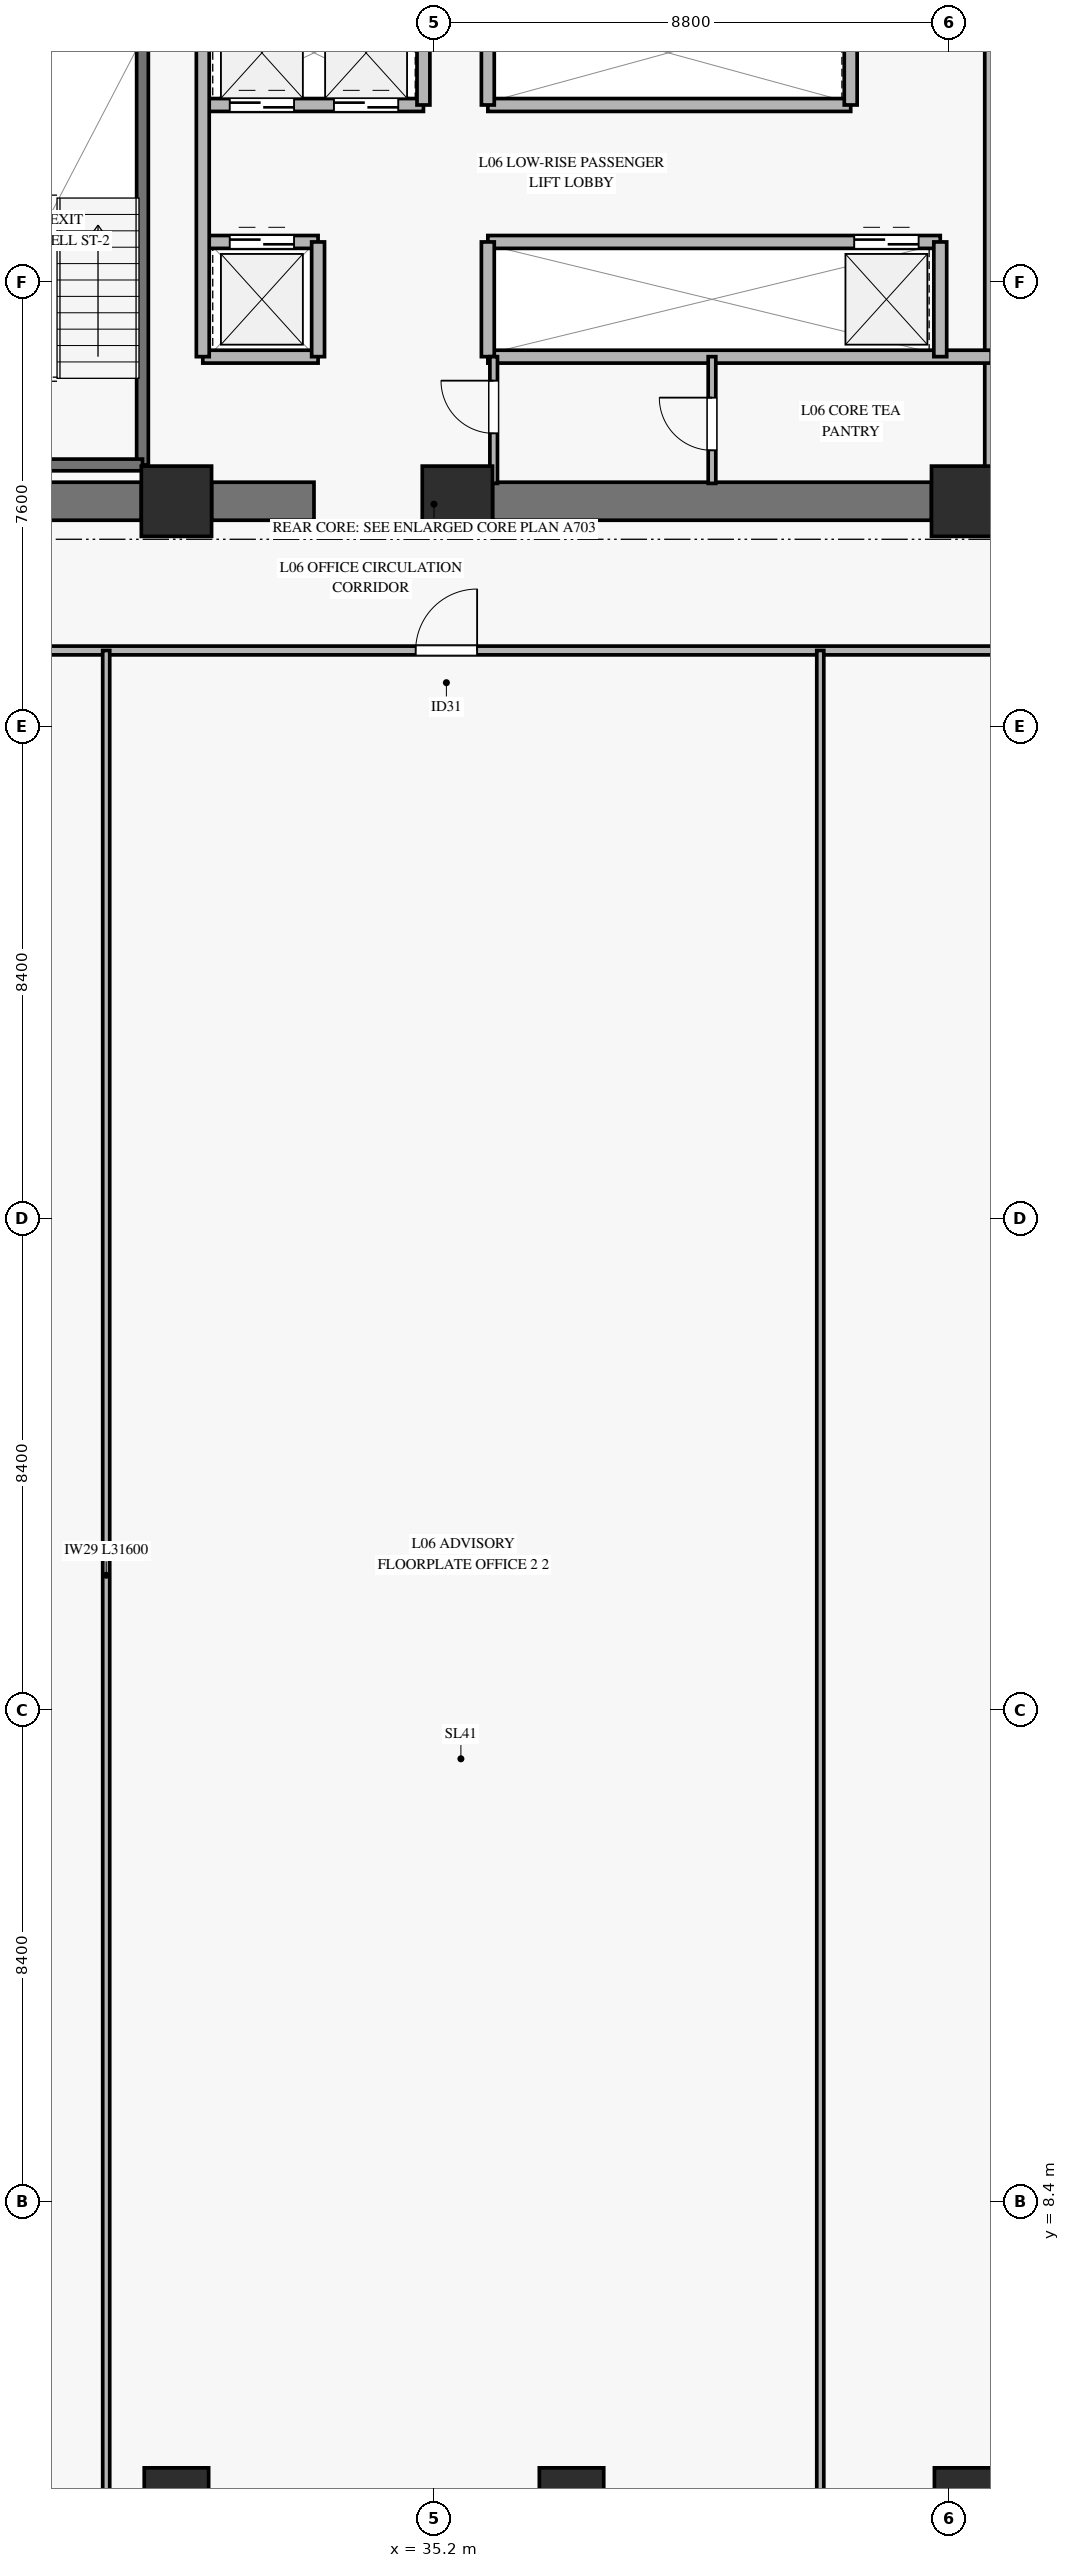
"""IFC4 building model, lengths in metres.
Left out: names, types, materials, properties, quantities, classifications, styles, units other than length and angle.
Written with IfcOpenShell. Run it as: python <this file> out.ifc"""

import sys

from ifc_helpers import new_model, si_unit, direction, frame, frame_2d, origin, origin_2d, place, context, subcontext, project, spatial, rectangle, hollow_rectangle, extrude, source, transform, mapped, element, fill, save


model = new_model("IFC4")
c1 = context("Model", 3, precision=1e-05, world=origin(), true_north=direction((0.0, 1.0)))
c2 = subcontext(c1, "Body", "Model", "MODEL_VIEW")
j1 = project(units=[si_unit("LENGTHUNIT", "METRE"), si_unit("PLANEANGLEUNIT", "RADIAN")], contexts=[c1])
p1 = place(None, origin())
s1 = spatial("IfcSite", under=j1, at=p1, CompositionType="ELEMENT")
p2 = place(p1, origin())
s2 = spatial("IfcBuilding", under=s1, at=p2, CompositionType="ELEMENT")
p3 = place(p2, frame((0.0, 0.0, 25.4)))
s3 = spatial("IfcBuildingStorey", under=s2, at=p3, CompositionType="ELEMENT", Elevation=25.4)
m1 = source(origin(), c2, "Body", "SweptSolid", [
    extrude(rectangle(XDim=1.2, YDim=1.2, at=origin_2d()), origin(), (0.0, 0.0, 1.0), 3.68),
])
for number, where, z_axis, x_axis in (
    (1, (30.8, 37.45, 0.0), (0.0, 0.0, 1.0), (1.0, 0.0, 0.0)),
    (2, (35.6, 37.45, 0.0), (0.0, 0.0, 1.0), (1.0, 0.0, 0.0)),
    (3, (44.3, 37.45, 0.0), (0.0, 0.0, 1.0), (1.0, 0.0, 0.0)),
):
    element("IfcColumn", number, at=place(p3, frame(where, z_axis=z_axis, x_axis=x_axis)), inside=s3, PredefinedType="PILASTER", context=c2, shape_type="MappedRepresentation", body=[
        mapped(m1, transform((0.0, 0.0, 0.0), x_axis=(1.0, 0.0, 0.0), y_axis=(0.0, 1.0, 0.0), z_axis=(0.0, 0.0, 1.0), scale=1.0)),
    ])
p4 = place(p3, frame((20.45, 37.45, 0.0), z_axis=(0.0, 0.0, 1.0), x_axis=(1.0, 0.0, 0.0)))
e4 = element("IfcWall", 4, at=p4, inside=s3, PredefinedType="SHEAR", context=c2, shape_type="SweptSolid", body=[
    extrude(rectangle(XDim=9.75, YDim=0.65, at=frame_2d((4.875, 0.0))), origin(), (0.0, 0.0, 1.0), 3.68),
])
p5 = place(p4, frame((4.1, 0.0, 0.0)))
e5 = element("IfcOpeningElement", 5, at=p5, cuts=e4, PredefinedType="OPENING", context=c2, shape_type="SweptSolid", body=[
    extrude(rectangle(XDim=1.2, YDim=2.15, at=frame_2d((0.6, 1.075))), frame((0.0, 0.335, 0.0), z_axis=(0.0, -1.0, 0.0), x_axis=(1.0, 0.0, 0.0)), (0.0, 0.0, 1.0), 0.67),
])
p6 = place(p3, frame((31.4, 37.45, 0.0), z_axis=(0.0, 0.0, 1.0), x_axis=(1.0, 0.0, 0.0)))
e6 = element("IfcWall", 6, at=p6, inside=s3, PredefinedType="SHEAR", context=c2, shape_type="SweptSolid", body=[
    extrude(rectangle(XDim=1.75, YDim=0.65, at=frame_2d((0.875, 0.0))), origin(), (0.0, 0.0, 1.0), 3.68),
])
p7 = place(p3, frame((36.2, 37.45, 0.0), z_axis=(0.0, 0.0, 1.0), x_axis=(1.0, 0.0, 0.0)))
e7 = element("IfcWall", 7, at=p7, inside=s3, PredefinedType="SHEAR", context=c2, shape_type="SweptSolid", body=[
    extrude(rectangle(XDim=7.5, YDim=0.65, at=frame_2d((3.75, 0.0))), origin(), (0.0, 0.0, 1.0), 3.68),
])
m2 = source(origin(), c2, "Body", "SweptSolid", [
    extrude(hollow_rectangle(XDim=1.1, YDim=1.1, WallThickness=0.05, at=origin_2d()), origin(), (0.0, 0.0, 1.0), 3.68),
])
for number, where, z_axis, x_axis in (
    (8, (30.8, 3.3, 0.0), (0.0, 0.0, 1.0), (1.0, 0.0, 0.0)),
    (9, (37.55, 3.3, 0.0), (0.0, 0.0, 1.0), (1.0, 0.0, 0.0)),
    (10, (44.3, 3.3, 0.0), (0.0, 0.0, 1.0), (1.0, 0.0, 0.0)),
):
    element("IfcColumn", number, at=place(p3, frame(where, z_axis=z_axis, x_axis=x_axis)), inside=s3, PredefinedType="COLUMN", context=c2, shape_type="MappedRepresentation", body=[
        mapped(m2, transform((0.0, 0.0, 0.0), x_axis=(1.0, 0.0, 0.0), y_axis=(0.0, 1.0, 0.0), z_axis=(0.0, 0.0, 1.0), scale=1.0)),
    ])
p8 = place(p3, frame((30.22, 38.07, 0.0), z_axis=(0.0, 0.0, 1.0), x_axis=(0.0, 1.0, 0.0)))
e11 = element("IfcWall", 11, at=p8, inside=s3, PredefinedType="SOLIDWALL", context=c2, shape_type="SweptSolid", body=[
    extrude(rectangle(XDim=7.25, YDim=0.2, at=frame_2d((3.625, 0.0))), origin(), (0.0, 0.0, 1.0), 3.9),
])
p9 = place(p3, frame((27.14, 38.07, 0.0), z_axis=(0.0, 0.0, 1.0), x_axis=(1.0, 0.0, 0.0)))
e12 = element("IfcWall", 12, at=p9, inside=s3, PredefinedType="SOLIDWALL", context=c2, shape_type="SweptSolid", body=[
    extrude(rectangle(XDim=3.08, YDim=0.2, at=frame_2d((1.54, 0.0))), origin(), (0.0, 0.0, 1.0), 3.9),
])
p10 = place(p3, frame((44.72, 37.755, 0.0), z_axis=(0.0, 0.0, 1.0), x_axis=(0.0, 1.0, 0.0)))
e13 = element("IfcWall", 13, at=p10, inside=s3, PredefinedType="SOLIDWALL", context=c2, shape_type="SweptSolid", body=[
    extrude(rectangle(XDim=7.465, YDim=0.22, at=frame_2d((3.732, 0.0))), origin(), (0.0, 0.0, 1.0), 3.68),
])
p11 = place(p3, frame((31.25, 44.22, 0.0), z_axis=(0.0, 0.0, 1.0), x_axis=(1.0, 0.0, 0.0)))
e14 = element("IfcWall", 14, at=p11, inside=s3, PredefinedType="SOLIDWALL", context=c2, shape_type="SweptSolid", body=[
    extrude(rectangle(XDim=3.77, YDim=0.22, at=frame_2d((1.885, 0.0))), origin(), (0.0, 0.0, 1.0), 3.68),
])
p12 = place(p11, frame((0.46, 0.0, 0.0)))
e15 = element("IfcOpeningElement", 15, at=p12, cuts=e14, PredefinedType="OPENING", context=c2, shape_type="SweptSolid", body=[
    extrude(rectangle(XDim=1.1, YDim=2.2, at=frame_2d((0.55, 1.1))), frame((0.0, 0.12, 0.0), z_axis=(0.0, -1.0, 0.0), x_axis=(1.0, 0.0, 0.0)), (0.0, 0.0, 1.0), 0.24),
])
p13 = place(p11, frame((2.24, 0.0, 0.0)))
e16 = element("IfcOpeningElement", 16, at=p13, cuts=e14, PredefinedType="OPENING", context=c2, shape_type="SweptSolid", body=[
    extrude(rectangle(XDim=1.1, YDim=2.2, at=frame_2d((0.55, 1.1))), frame((0.0, 0.12, 0.0), z_axis=(0.0, -1.0, 0.0), x_axis=(1.0, 0.0, 0.0)), (0.0, 0.0, 1.0), 0.24),
])
p14 = place(p3, frame((36.12, 44.22, 0.0), z_axis=(0.0, 0.0, 1.0), x_axis=(1.0, 0.0, 0.0)))
e17 = element("IfcWall", 17, at=p14, inside=s3, PredefinedType="SOLIDWALL", context=c2, shape_type="SweptSolid", body=[
    extrude(rectangle(XDim=6.2, YDim=0.22, at=frame_2d((3.1, 0.0))), origin(), (0.0, 0.0, 1.0), 3.68),
])
for number, where, z_axis, x_axis in (
    (18, (35.02, 44.22, 0.0), (0.0, 0.0, 1.0), (0.0, 1.0, 0.0)),
    (19, (36.12, 44.22, 0.0), (0.0, 0.0, 1.0), (0.0, 1.0, 0.0)),
    (20, (42.32, 44.22, 0.0), (0.0, 0.0, 1.0), (0.0, 1.0, 0.0)),
):
    element("IfcWall", number, at=place(p3, frame(where, z_axis=z_axis, x_axis=x_axis)), inside=s3, PredefinedType="SOLIDWALL", context=c2, shape_type="SweptSolid", body=[
        extrude(rectangle(XDim=2.025, YDim=0.22, at=frame_2d((1.013, 0.0))), origin(), (0.0, 0.0, 1.0), 3.68),
    ])
p15 = place(p3, frame((31.25, 41.88, 0.0), z_axis=(0.0, 0.0, 1.0), x_axis=(1.0, 0.0, 0.0)))
e21 = element("IfcWall", 21, at=p15, inside=s3, PredefinedType="SOLIDWALL", context=c2, shape_type="SweptSolid", body=[
    extrude(rectangle(XDim=1.97, YDim=0.22, at=frame_2d((0.985, 0.0))), origin(), (0.0, 0.0, 1.0), 3.68),
])
p16 = place(p15, frame((0.46, 0.0, 0.0)))
e22 = element("IfcOpeningElement", 22, at=p16, cuts=e21, PredefinedType="OPENING", context=c2, shape_type="SweptSolid", body=[
    extrude(rectangle(XDim=1.1, YDim=2.2, at=frame_2d((0.55, 1.1))), frame((0.0, 0.12, 0.0), z_axis=(0.0, -1.0, 0.0), x_axis=(1.0, 0.0, 0.0)), (0.0, 0.0, 1.0), 0.24),
])
p17 = place(p3, frame((36.12, 41.88, 0.0), z_axis=(0.0, 0.0, 1.0), x_axis=(1.0, 0.0, 0.0)))
e23 = element("IfcWall", 23, at=p17, inside=s3, PredefinedType="SOLIDWALL", context=c2, shape_type="SweptSolid", body=[
    extrude(rectangle(XDim=7.73, YDim=0.22, at=frame_2d((3.865, 0.0))), origin(), (0.0, 0.0, 1.0), 3.68),
])
p18 = place(p17, frame((6.26, 0.0, 0.0)))
e24 = element("IfcOpeningElement", 24, at=p18, cuts=e23, PredefinedType="OPENING", context=c2, shape_type="SweptSolid", body=[
    extrude(rectangle(XDim=1.1, YDim=2.2, at=frame_2d((0.55, 1.1))), frame((0.0, 0.12, 0.0), z_axis=(0.0, -1.0, 0.0), x_axis=(1.0, 0.0, 0.0)), (0.0, 0.0, 1.0), 0.24),
])
p19 = place(p3, frame((31.25, 39.92, 0.0), z_axis=(0.0, 0.0, 1.0), x_axis=(1.0, 0.0, 0.0)))
e25 = element("IfcWall", 25, at=p19, inside=s3, PredefinedType="SOLIDWALL", context=c2, shape_type="SweptSolid", body=[
    extrude(rectangle(XDim=1.97, YDim=0.22, at=frame_2d((0.985, 0.0))), origin(), (0.0, 0.0, 1.0), 3.68),
])
p20 = place(p3, frame((33.22, 39.92, 0.0), z_axis=(0.0, 0.0, 1.0), x_axis=(0.0, 1.0, 0.0)))
e26 = element("IfcWall", 26, at=p20, inside=s3, PredefinedType="SOLIDWALL", context=c2, shape_type="SweptSolid", body=[
    extrude(rectangle(XDim=1.96, YDim=0.22, at=frame_2d((0.98, 0.0))), origin(), (0.0, 0.0, 1.0), 3.68),
])
p21 = place(p3, frame((36.12, 39.92, 0.0), z_axis=(0.0, 0.0, 1.0), x_axis=(1.0, 0.0, 0.0)))
e27 = element("IfcWall", 27, at=p21, inside=s3, PredefinedType="SOLIDWALL", context=c2, shape_type="SweptSolid", body=[
    extrude(rectangle(XDim=8.6, YDim=0.22, at=frame_2d((4.3, 0.0))), origin(), (0.0, 0.0, 1.0), 2.965),
])
p22 = place(p3, frame((36.12, 39.92, 0.0), z_axis=(0.0, 0.0, 1.0), x_axis=(0.0, 1.0, 0.0)))
e28 = element("IfcWall", 28, at=p22, inside=s3, PredefinedType="SOLIDWALL", context=c2, shape_type="SweptSolid", body=[
    extrude(rectangle(XDim=1.96, YDim=0.22, at=frame_2d((0.98, 0.0))), origin(), (0.0, 0.0, 1.0), 3.68),
])
p23 = place(p3, frame((31.25, 39.92, 0.0), z_axis=(0.0, 0.0, 1.0), x_axis=(0.0, 1.0, 0.0)))
e29 = element("IfcWall", 29, at=p23, inside=s3, PredefinedType="SOLIDWALL", context=c2, shape_type="SweptSolid", body=[
    extrude(rectangle(XDim=6.325, YDim=0.22, at=frame_2d((3.163, 0.0))), origin(), (0.0, 0.0, 1.0), 3.68),
])
p24 = place(p3, frame((43.85, 39.92, 0.0), z_axis=(0.0, 0.0, 1.0), x_axis=(0.0, 1.0, 0.0)))
e30 = element("IfcWall", 30, at=p24, inside=s3, PredefinedType="SOLIDWALL", context=c2, shape_type="SweptSolid", body=[
    extrude(rectangle(XDim=1.96, YDim=0.22, at=frame_2d((0.98, 0.0))), origin(), (0.0, 0.0, 1.0), 3.68),
])
p25 = place(p3, frame((36.22, 37.755, 0.0), z_axis=(0.0, 0.0, 1.0), x_axis=(0.0, 1.0, 0.0)))
e31 = element("IfcWall", 31, at=p25, inside=s3, PredefinedType="PARTITIONING", context=c2, shape_type="SweptSolid", body=[
    extrude(rectangle(XDim=2.165, YDim=0.13, at=frame_2d((1.083, 0.0))), origin(), (0.0, 0.0, 1.0), 3.68),
])
p26 = place(p25, frame((0.855, 0.0, 0.0)))
e32 = element("IfcOpeningElement", 32, at=p26, cuts=e31, PredefinedType="OPENING", context=c2, shape_type="SweptSolid", body=[
    extrude(rectangle(XDim=0.9, YDim=2.1, at=frame_2d((0.45, 1.05))), frame((0.0, 0.075, 0.0), z_axis=(0.0, -1.0, 0.0), x_axis=(1.0, 0.0, 0.0)), (0.0, 0.0, 1.0), 0.15),
])
p27 = place(p3, frame((39.95, 37.755, 0.0), z_axis=(0.0, 0.0, 1.0), x_axis=(0.0, 1.0, 0.0)))
e33 = element("IfcWall", 33, at=p27, inside=s3, PredefinedType="PARTITIONING", context=c2, shape_type="SweptSolid", body=[
    extrude(rectangle(XDim=2.165, YDim=0.13, at=frame_2d((1.083, 0.0))), origin(), (0.0, 0.0, 1.0), 3.68),
])
p28 = place(p27, frame((0.565, 0.0, 0.0)))
e34 = element("IfcOpeningElement", 34, at=p28, cuts=e33, PredefinedType="OPENING", context=c2, shape_type="SweptSolid", body=[
    extrude(rectangle(XDim=0.9, YDim=2.1, at=frame_2d((0.45, 1.05))), frame((0.0, 0.075, 0.0), z_axis=(0.0, -1.0, 0.0), x_axis=(1.0, 0.0, 0.0)), (0.0, 0.0, 1.0), 0.15),
])
p29 = place(p3, frame((3.1, 34.9, 0.0), z_axis=(0.0, 0.0, 1.0), x_axis=(1.0, 0.0, 0.0)))
e35 = element("IfcWall", 35, at=p29, inside=s3, PredefinedType="PARTITIONING", context=c2, shape_type="SweptSolid", body=[
    extrude(rectangle(XDim=64.2, YDim=0.15, at=frame_2d((32.1, 0.0))), origin(), (0.0, 0.0, 1.0), 2.765),
])
p30 = place(p29, frame((11.409, 0.0, 0.0)))
e36 = element("IfcOpeningElement", 36, at=p30, cuts=e35, PredefinedType="OPENING", context=c2, shape_type="SweptSolid", body=[
    extrude(rectangle(XDim=1.05, YDim=2.15, at=frame_2d((0.525, 1.075))), frame((0.0, 0.085, 0.0), z_axis=(0.0, -1.0, 0.0), x_axis=(1.0, 0.0, 0.0)), (0.0, 0.0, 1.0), 0.17),
])
p31 = place(p29, frame((31.787, 0.0, 0.0)))
e37 = element("IfcOpeningElement", 37, at=p31, cuts=e35, PredefinedType="OPENING", context=c2, shape_type="SweptSolid", body=[
    extrude(rectangle(XDim=1.05, YDim=2.15, at=frame_2d((0.525, 1.075))), frame((0.0, 0.085, 0.0), z_axis=(0.0, -1.0, 0.0), x_axis=(1.0, 0.0, 0.0)), (0.0, 0.0, 1.0), 0.17),
])
p32 = place(p29, frame((49.489, 0.0, 0.0)))
e38 = element("IfcOpeningElement", 38, at=p32, cuts=e35, PredefinedType="OPENING", context=c2, shape_type="SweptSolid", body=[
    extrude(rectangle(XDim=1.05, YDim=2.15, at=frame_2d((0.525, 1.075))), frame((0.0, 0.085, 0.0), z_axis=(0.0, -1.0, 0.0), x_axis=(1.0, 0.0, 0.0)), (0.0, 0.0, 1.0), 0.17),
])
for number, where, z_axis, x_axis in (
    (39, (29.6, 3.3, 0.0), (0.0, 0.0, 1.0), (0.0, 1.0, 0.0)),
    (40, (41.8, 3.3, 0.0), (0.0, 0.0, 1.0), (0.0, 1.0, 0.0)),
):
    element("IfcWall", number, at=place(p3, frame(where, z_axis=z_axis, x_axis=x_axis)), inside=s3, PredefinedType="PARTITIONING", context=c2, shape_type="SweptSolid", body=[
        extrude(rectangle(XDim=31.6, YDim=0.12, at=frame_2d((15.8, 0.0))), origin(), (0.0, 0.0, 1.0), 3.165),
    ])
m3 = source(origin(), c2, "Body", "SweptSolid", [
    extrude(rectangle(XDim=1.1, YDim=2.2, at=frame_2d((0.55, 1.1))), frame((0.0, 0.025, 0.0), z_axis=(0.0, -1.0, 0.0), x_axis=(1.0, 0.0, 0.0)), (0.0, 0.0, 1.0), 0.05),
])
p33 = place(p12, origin())
e41 = element("IfcDoor", 41, at=p33, inside=s3, OperationType="SLIDING_TO_LEFT", PredefinedType="DOOR", context=c2, shape_type="MappedRepresentation", body=[
    mapped(m3, transform((0.0, 0.0, 0.0), x_axis=(1.0, 0.0, 0.0), y_axis=(0.0, 1.0, 0.0), z_axis=(0.0, 0.0, 1.0), scale=1.0)),
])
fill(e15, e41)
p34 = place(p13, origin())
e42 = element("IfcDoor", 42, at=p34, inside=s3, OperationType="SLIDING_TO_LEFT", PredefinedType="DOOR", context=c2, shape_type="MappedRepresentation", body=[
    mapped(m3, transform((0.0, 0.0, 0.0), x_axis=(1.0, 0.0, 0.0), y_axis=(0.0, 1.0, 0.0), z_axis=(0.0, 0.0, 1.0), scale=1.0)),
])
fill(e16, e42)
p35 = place(p16, origin())
e43 = element("IfcDoor", 43, at=p35, inside=s3, OperationType="SLIDING_TO_LEFT", PredefinedType="DOOR", context=c2, shape_type="MappedRepresentation", body=[
    mapped(m3, transform((0.0, 0.0, 0.0), x_axis=(1.0, 0.0, 0.0), y_axis=(0.0, 1.0, 0.0), z_axis=(0.0, 0.0, 1.0), scale=1.0)),
])
fill(e22, e43)
p36 = place(p18, origin())
e44 = element("IfcDoor", 44, at=p36, inside=s3, OperationType="SLIDING_TO_LEFT", PredefinedType="DOOR", context=c2, shape_type="MappedRepresentation", body=[
    mapped(m3, transform((0.0, 0.0, 0.0), x_axis=(1.0, 0.0, 0.0), y_axis=(0.0, 1.0, 0.0), z_axis=(0.0, 0.0, 1.0), scale=1.0)),
])
fill(e24, e44)
m4 = source(origin(), c2, "Body", "SweptSolid", [
    extrude(rectangle(XDim=0.9, YDim=2.1, at=frame_2d((0.45, 1.05))), frame((0.0, 0.025, 0.0), z_axis=(0.0, -1.0, 0.0), x_axis=(1.0, 0.0, 0.0)), (0.0, 0.0, 1.0), 0.05),
])
p37 = place(p26, origin())
e45 = element("IfcDoor", 45, at=p37, inside=s3, OperationType="SINGLE_SWING_RIGHT", PredefinedType="DOOR", context=c2, shape_type="MappedRepresentation", body=[
    mapped(m4, transform((0.0, 0.0, 0.0), x_axis=(1.0, 0.0, 0.0), y_axis=(0.0, 1.0, 0.0), z_axis=(0.0, 0.0, 1.0), scale=1.0)),
])
fill(e32, e45)
p38 = place(p28, origin())
e46 = element("IfcDoor", 46, at=p38, inside=s3, OperationType="SINGLE_SWING_RIGHT", PredefinedType="DOOR", context=c2, shape_type="MappedRepresentation", body=[
    mapped(m4, transform((0.0, 0.0, 0.0), x_axis=(1.0, 0.0, 0.0), y_axis=(0.0, 1.0, 0.0), z_axis=(0.0, 0.0, 1.0), scale=1.0)),
])
fill(e34, e46)
m5 = source(origin(), c2, "Body", "SweptSolid", [
    extrude(rectangle(XDim=1.05, YDim=2.15, at=frame_2d((0.525, 1.075))), frame((0.0, 0.025, 0.0), z_axis=(0.0, -1.0, 0.0), x_axis=(1.0, 0.0, 0.0)), (0.0, 0.0, 1.0), 0.05),
])
p39 = place(p31, origin())
e47 = element("IfcDoor", 47, at=p39, inside=s3, OperationType="SINGLE_SWING_RIGHT", PredefinedType="DOOR", context=c2, shape_type="MappedRepresentation", body=[
    mapped(m5, transform((0.0, 0.0, 0.0), x_axis=(1.0, 0.0, 0.0), y_axis=(0.0, 1.0, 0.0), z_axis=(0.0, 0.0, 1.0), scale=1.0)),
])
fill(e37, e47)
save(model, sys.argv[1])
